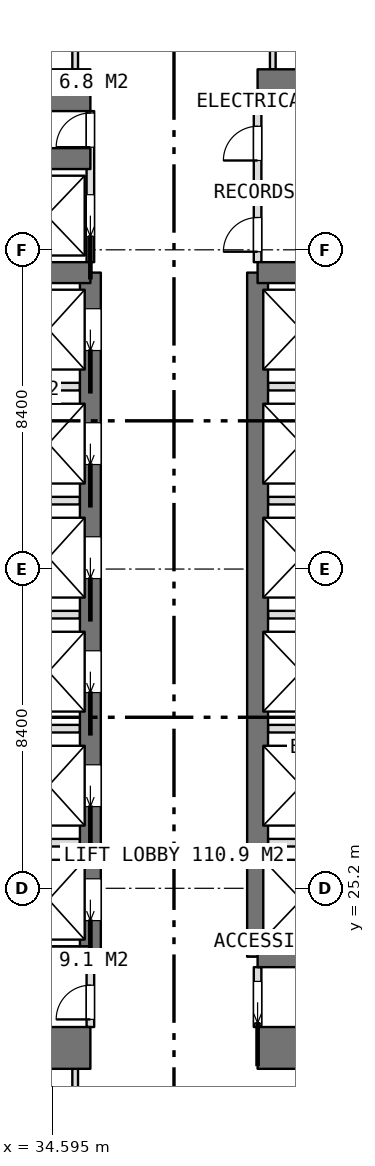
"""IFC4 building model, lengths in metres.
Left out: names, types, materials, properties, quantities, classifications, styles, units other than length and angle.
Written with IfcOpenShell. Run it as: python <this file> out.ifc"""

import sys

from ifc_helpers import new_model, si_unit, direction, frame, frame_2d, origin, place, context, subcontext, project, spatial, rectangle, extrude, element, fill, save


model = new_model("IFC4")
c1 = context("Model", 3, precision=1e-05, world=origin(), true_north=direction((0.0, 1.0)))
c2 = subcontext(c1, "Body", "Model", "MODEL_VIEW")
j1 = project(units=[si_unit("LENGTHUNIT", "METRE"), si_unit("PLANEANGLEUNIT", "RADIAN")], contexts=[c1])
p1 = place(None, origin())
s1 = spatial("IfcSite", under=j1, at=p1, CompositionType="ELEMENT")
p2 = place(p1, origin())
s2 = spatial("IfcBuilding", under=s1, at=p2, CompositionType="ELEMENT")
p3 = place(p2, frame((0.0, 0.0, 25.4)))
s3 = spatial("IfcBuildingStorey", under=s2, at=p3, CompositionType="ELEMENT", Elevation=25.4)
p4 = place(p3, frame((25.2, 21.0, 0.0), z_axis=(0.0, 0.0, 1.0), x_axis=(1.0, 0.0, 0.0)))
e1 = element("IfcWall", 1, at=p4, inside=s3, PredefinedType="SHEAR", context=c2, shape_type="SweptSolid", body=[
    extrude(rectangle(XDim=10.4, YDim=1.1, at=frame_2d((5.2, 0.0))), origin(), (0.0, 0.0, 1.0), 3.75),
])
p5 = place(p3, frame((40.0, 21.0, 0.0), z_axis=(0.0, 0.0, 1.0), x_axis=(1.0, 0.0, 0.0)))
e2 = element("IfcWall", 2, at=p5, inside=s3, PredefinedType="SHEAR", context=c2, shape_type="SweptSolid", body=[
    extrude(rectangle(XDim=10.4, YDim=1.1, at=frame_2d((5.2, 0.0))), origin(), (0.0, 0.0, 1.0), 3.75),
])
p6 = place(p3, frame((25.2, 46.2, 0.0), z_axis=(0.0, 0.0, 1.0), x_axis=(1.0, 0.0, 0.0)))
e3 = element("IfcWall", 3, at=p6, inside=s3, PredefinedType="SHEAR", context=c2, shape_type="SweptSolid", body=[
    extrude(rectangle(XDim=10.4, YDim=1.1, at=frame_2d((5.2, 0.0))), origin(), (0.0, 0.0, 1.0), 3.75),
])
p7 = place(p3, frame((40.0, 46.2, 0.0), z_axis=(0.0, 0.0, 1.0), x_axis=(1.0, 0.0, 0.0)))
e4 = element("IfcWall", 4, at=p7, inside=s3, PredefinedType="SHEAR", context=c2, shape_type="SweptSolid", body=[
    extrude(rectangle(XDim=10.4, YDim=1.1, at=frame_2d((5.2, 0.0))), origin(), (0.0, 0.0, 1.0), 3.75),
])
p8 = place(p3, frame((35.6, 23.4, 0.0), z_axis=(0.0, 0.0, 1.0), x_axis=(0.0, 1.0, 0.0)))
e5 = element("IfcWall", 5, at=p8, inside=s3, PredefinedType="SHEAR", context=c2, shape_type="SweptSolid", body=[
    extrude(rectangle(XDim=18.0, YDim=0.55, at=frame_2d((9.0, 0.0))), origin(), (0.0, 0.0, 1.0), 3.75),
])
p9 = place(p8, frame((0.95, 0.0, 0.0)))
e6 = element("IfcOpeningElement", 6, at=p9, cuts=e5, PredefinedType="OPENING", context=c2, shape_type="SweptSolid", body=[
    extrude(rectangle(XDim=1.1, YDim=2.1, at=frame_2d((0.55, 1.05))), frame((0.0, 0.285, 0.0), z_axis=(0.0, -1.0, 0.0), x_axis=(1.0, 0.0, 0.0)), (0.0, 0.0, 1.0), 0.57),
])
p10 = place(p8, frame((3.95, 0.0, 0.0)))
e7 = element("IfcOpeningElement", 7, at=p10, cuts=e5, PredefinedType="OPENING", context=c2, shape_type="SweptSolid", body=[
    extrude(rectangle(XDim=1.1, YDim=2.1, at=frame_2d((0.55, 1.05))), frame((0.0, 0.285, 0.0), z_axis=(0.0, -1.0, 0.0), x_axis=(1.0, 0.0, 0.0)), (0.0, 0.0, 1.0), 0.57),
])
p11 = place(p8, frame((6.95, 0.0, 0.0)))
e8 = element("IfcOpeningElement", 8, at=p11, cuts=e5, PredefinedType="OPENING", context=c2, shape_type="SweptSolid", body=[
    extrude(rectangle(XDim=1.1, YDim=2.1, at=frame_2d((0.55, 1.05))), frame((0.0, 0.285, 0.0), z_axis=(0.0, -1.0, 0.0), x_axis=(1.0, 0.0, 0.0)), (0.0, 0.0, 1.0), 0.57),
])
p12 = place(p8, frame((9.95, 0.0, 0.0)))
e9 = element("IfcOpeningElement", 9, at=p12, cuts=e5, PredefinedType="OPENING", context=c2, shape_type="SweptSolid", body=[
    extrude(rectangle(XDim=1.1, YDim=2.1, at=frame_2d((0.55, 1.05))), frame((0.0, 0.285, 0.0), z_axis=(0.0, -1.0, 0.0), x_axis=(1.0, 0.0, 0.0)), (0.0, 0.0, 1.0), 0.57),
])
p13 = place(p8, frame((12.95, 0.0, 0.0)))
e10 = element("IfcOpeningElement", 10, at=p13, cuts=e5, PredefinedType="OPENING", context=c2, shape_type="SweptSolid", body=[
    extrude(rectangle(XDim=1.1, YDim=2.1, at=frame_2d((0.55, 1.05))), frame((0.0, 0.285, 0.0), z_axis=(0.0, -1.0, 0.0), x_axis=(1.0, 0.0, 0.0)), (0.0, 0.0, 1.0), 0.57),
])
p14 = place(p8, frame((15.95, 0.0, 0.0)))
e11 = element("IfcOpeningElement", 11, at=p14, cuts=e5, PredefinedType="OPENING", context=c2, shape_type="SweptSolid", body=[
    extrude(rectangle(XDim=1.1, YDim=2.1, at=frame_2d((0.55, 1.05))), frame((0.0, 0.285, 0.0), z_axis=(0.0, -1.0, 0.0), x_axis=(1.0, 0.0, 0.0)), (0.0, 0.0, 1.0), 0.57),
])
p15 = place(p3, frame((40.0, 23.4, 0.0), z_axis=(0.0, 0.0, 1.0), x_axis=(0.0, 1.0, 0.0)))
e12 = element("IfcWall", 12, at=p15, inside=s3, PredefinedType="SHEAR", context=c2, shape_type="SweptSolid", body=[
    extrude(rectangle(XDim=18.0, YDim=0.55, at=frame_2d((9.0, 0.0))), origin(), (0.0, 0.0, 1.0), 3.75),
])
for number, where, z_axis, x_axis in (
    (13, (31.8, 23.4, 0.0), (0.0, 0.0, 1.0), (1.0, 0.0, 0.0)),
    (14, (31.8, 41.4, 0.0), (0.0, 0.0, 1.0), (1.0, 0.0, 0.0)),
    (15, (31.8, 44.4, 0.0), (0.0, 0.0, 1.0), (1.0, 0.0, 0.0)),
    (16, (40.0, 23.4, 0.0), (0.0, 0.0, 1.0), (1.0, 0.0, 0.0)),
    (17, (40.0, 41.4, 0.0), (0.0, 0.0, 1.0), (1.0, 0.0, 0.0)),
):
    element("IfcWall", number, at=place(p3, frame(where, z_axis=z_axis, x_axis=x_axis)), inside=s3, PredefinedType="SHEAR", context=c2, shape_type="SweptSolid", body=[
        extrude(rectangle(XDim=3.8, YDim=0.55, at=frame_2d((1.9, 0.0))), origin(), (0.0, 0.0, 1.0), 3.75),
    ])
for number, where, z_axis, x_axis in (
    (18, (32.075, 26.4, 0.0), (0.0, 0.0, 1.0), (1.0, 0.0, 0.0)),
    (19, (32.075, 29.4, 0.0), (0.0, 0.0, 1.0), (1.0, 0.0, 0.0)),
    (20, (32.075, 32.4, 0.0), (0.0, 0.0, 1.0), (1.0, 0.0, 0.0)),
    (21, (32.075, 35.4, 0.0), (0.0, 0.0, 1.0), (1.0, 0.0, 0.0)),
    (22, (32.075, 38.4, 0.0), (0.0, 0.0, 1.0), (1.0, 0.0, 0.0)),
    (23, (40.275, 26.4, 0.0), (0.0, 0.0, 1.0), (1.0, 0.0, 0.0)),
    (24, (40.275, 29.4, 0.0), (0.0, 0.0, 1.0), (1.0, 0.0, 0.0)),
    (25, (40.275, 32.4, 0.0), (0.0, 0.0, 1.0), (1.0, 0.0, 0.0)),
    (26, (40.275, 35.4, 0.0), (0.0, 0.0, 1.0), (1.0, 0.0, 0.0)),
    (27, (40.275, 38.4, 0.0), (0.0, 0.0, 1.0), (1.0, 0.0, 0.0)),
):
    element("IfcWall", number, at=place(p3, frame(where, z_axis=z_axis, x_axis=x_axis)), inside=s3, PredefinedType="PARTITIONING", context=c2, shape_type="SweptSolid", body=[
        extrude(rectangle(XDim=3.25, YDim=0.2, at=frame_2d((1.625, 0.0))), origin(), (0.0, 0.0, 1.0), 3.5),
    ])
p16 = place(p3, frame((40.0, 21.55, 0.0), z_axis=(0.0, 0.0, 1.0), x_axis=(0.0, 1.0, 0.0)))
e28 = element("IfcWall", 28, at=p16, inside=s3, PredefinedType="PARTITIONING", context=c2, shape_type="SweptSolid", body=[
    extrude(rectangle(XDim=1.575, YDim=0.2, at=frame_2d((0.788, 0.0))), origin(), (0.0, 0.0, 1.0), 3.5),
])
p17 = place(p16, frame((0.1, 0.0, 0.0)))
e29 = element("IfcOpeningElement", 29, at=p17, cuts=e28, PredefinedType="OPENING", context=c2, shape_type="SweptSolid", body=[
    extrude(rectangle(XDim=1.1, YDim=2.1, at=frame_2d((0.55, 1.05))), frame((0.0, 0.11, 0.0), z_axis=(0.0, -1.0, 0.0), x_axis=(1.0, 0.0, 0.0)), (0.0, 0.0, 1.0), 0.22),
])
p18 = place(p3, frame((40.0, 41.675, 0.0), z_axis=(0.0, 0.0, 1.0), x_axis=(0.0, 1.0, 0.0)))
e30 = element("IfcWall", 30, at=p18, inside=s3, PredefinedType="PARTITIONING", context=c2, shape_type="SweptSolid", body=[
    extrude(rectangle(XDim=3.975, YDim=0.2, at=frame_2d((1.987, 0.0))), origin(), (0.0, 0.0, 1.0), 3.5),
])
p19 = place(p18, frame((2.675, 0.0, 0.0)))
e31 = element("IfcOpeningElement", 31, at=p19, cuts=e30, PredefinedType="OPENING", context=c2, shape_type="SweptSolid", body=[
    extrude(rectangle(XDim=0.9, YDim=2.1, at=frame_2d((0.45, 1.05))), frame((0.0, 0.11, 0.0), z_axis=(0.0, -1.0, 0.0), x_axis=(1.0, 0.0, 0.0)), (0.0, 0.0, 1.0), 0.22),
])
p20 = place(p18, frame((0.275, 0.0, 0.0)))
e32 = element("IfcOpeningElement", 32, at=p20, cuts=e30, PredefinedType="OPENING", context=c2, shape_type="SweptSolid", body=[
    extrude(rectangle(XDim=0.9, YDim=2.1, at=frame_2d((0.45, 1.05))), frame((0.0, 0.11, 0.0), z_axis=(0.0, -1.0, 0.0), x_axis=(1.0, 0.0, 0.0)), (0.0, 0.0, 1.0), 0.22),
])
p21 = place(p3, frame((35.6, 41.675, 0.0), z_axis=(0.0, 0.0, 1.0), x_axis=(0.0, 1.0, 0.0)))
e33 = element("IfcWall", 33, at=p21, inside=s3, PredefinedType="PARTITIONING", context=c2, shape_type="SweptSolid", body=[
    extrude(rectangle(XDim=3.975, YDim=0.2, at=frame_2d((1.987, 0.0))), origin(), (0.0, 0.0, 1.0), 3.5),
])
p22 = place(p21, frame((3.025, 0.0, 0.0)))
e34 = element("IfcOpeningElement", 34, at=p22, cuts=e33, PredefinedType="OPENING", context=c2, shape_type="SweptSolid", body=[
    extrude(rectangle(XDim=0.9, YDim=2.1, at=frame_2d((0.45, 1.05))), frame((0.0, 0.11, 0.0), z_axis=(0.0, -1.0, 0.0), x_axis=(1.0, 0.0, 0.0)), (0.0, 0.0, 1.0), 0.22),
])
p23 = place(p21, frame((0.675, 0.0, 0.0)))
e35 = element("IfcOpeningElement", 35, at=p23, cuts=e33, PredefinedType="OPENING", context=c2, shape_type="SweptSolid", body=[
    extrude(rectangle(XDim=1.1, YDim=2.1, at=frame_2d((0.55, 1.05))), frame((0.0, 0.11, 0.0), z_axis=(0.0, -1.0, 0.0), x_axis=(1.0, 0.0, 0.0)), (0.0, 0.0, 1.0), 0.22),
])
p24 = place(p3, frame((35.6, 21.55, 0.0), z_axis=(0.0, 0.0, 1.0), x_axis=(0.0, 1.0, 0.0)))
e36 = element("IfcWall", 36, at=p24, inside=s3, PredefinedType="PARTITIONING", context=c2, shape_type="SweptSolid", body=[
    extrude(rectangle(XDim=1.575, YDim=0.2, at=frame_2d((0.788, 0.0))), origin(), (0.0, 0.0, 1.0), 3.5),
])
p25 = place(p24, frame((0.2, 0.0, 0.0)))
e37 = element("IfcOpeningElement", 37, at=p25, cuts=e36, PredefinedType="OPENING", context=c2, shape_type="SweptSolid", body=[
    extrude(rectangle(XDim=0.9, YDim=2.1, at=frame_2d((0.45, 1.05))), frame((0.0, 0.11, 0.0), z_axis=(0.0, -1.0, 0.0), x_axis=(1.0, 0.0, 0.0)), (0.0, 0.0, 1.0), 0.22),
])
p26 = place(p3, frame((40.0, 43.4, 0.0), z_axis=(0.0, 0.0, 1.0), x_axis=(1.0, 0.0, 0.0)))
e38 = element("IfcWall", 38, at=p26, inside=s3, PredefinedType="PARTITIONING", context=c2, shape_type="SweptSolid", body=[
    extrude(rectangle(XDim=3.525, YDim=0.2, at=frame_2d((1.762, 0.0))), origin(), (0.0, 0.0, 1.0), 3.5),
])
for number, where, z_axis, x_axis in (
    (39, (40.4, 46.75, 0.0), (0.0, 0.0, 1.0), (0.0, 1.0, 0.0)),
    (40, (35.2, 46.75, 0.0), (0.0, 0.0, 1.0), (0.0, 1.0, 0.0)),
    (41, (35.2, 17.875, 0.0), (0.0, 0.0, 1.0), (0.0, 1.0, 0.0)),
):
    element("IfcWall", number, at=place(p3, frame(where, z_axis=z_axis, x_axis=x_axis)), inside=s3, PredefinedType="PARTITIONING", context=c2, shape_type="SweptSolid", body=[
        extrude(rectangle(XDim=2.575, YDim=0.15, at=frame_2d((1.288, 0.0))), origin(), (0.0, 0.0, 1.0), 3.5),
    ])
p27 = place(p17, origin())
e42 = element("IfcDoor", 42, at=p27, inside=s3, OperationType="SLIDING_TO_LEFT", PredefinedType="DOOR", context=c2, shape_type="SweptSolid", body=[
    extrude(rectangle(XDim=1.1, YDim=2.1, at=frame_2d((0.55, 1.05))), frame((0.0, 0.025, 0.0), z_axis=(0.0, -1.0, 0.0), x_axis=(1.0, 0.0, 0.0)), (0.0, 0.0, 1.0), 0.05),
])
fill(e29, e42)
p28 = place(p25, origin())
e43 = element("IfcDoor", 43, at=p28, inside=s3, OperationType="SINGLE_SWING_LEFT", PredefinedType="DOOR", context=c2, shape_type="SweptSolid", body=[
    extrude(rectangle(XDim=0.9, YDim=2.1, at=frame_2d((0.45, 1.05))), frame((0.0, 0.025, 0.0), z_axis=(0.0, -1.0, 0.0), x_axis=(1.0, 0.0, 0.0)), (0.0, 0.0, 1.0), 0.05),
])
fill(e37, e43)
p29 = place(p19, origin())
e44 = element("IfcDoor", 44, at=p29, inside=s3, OperationType="SINGLE_SWING_LEFT", PredefinedType="DOOR", context=c2, shape_type="SweptSolid", body=[
    extrude(rectangle(XDim=0.9, YDim=2.1, at=frame_2d((0.45, 1.05))), frame((0.0, 0.025, 0.0), z_axis=(0.0, -1.0, 0.0), x_axis=(1.0, 0.0, 0.0)), (0.0, 0.0, 1.0), 0.05),
])
fill(e31, e44)
p30 = place(p20, origin())
e45 = element("IfcDoor", 45, at=p30, inside=s3, OperationType="SINGLE_SWING_LEFT", PredefinedType="DOOR", context=c2, shape_type="SweptSolid", body=[
    extrude(rectangle(XDim=0.9, YDim=2.1, at=frame_2d((0.45, 1.05))), frame((0.0, 0.025, 0.0), z_axis=(0.0, -1.0, 0.0), x_axis=(1.0, 0.0, 0.0)), (0.0, 0.0, 1.0), 0.05),
])
fill(e32, e45)
p31 = place(p22, origin())
e46 = element("IfcDoor", 46, at=p31, inside=s3, OperationType="SINGLE_SWING_LEFT", PredefinedType="DOOR", context=c2, shape_type="SweptSolid", body=[
    extrude(rectangle(XDim=0.9, YDim=2.1, at=frame_2d((0.45, 1.05))), frame((0.0, 0.025, 0.0), z_axis=(0.0, -1.0, 0.0), x_axis=(1.0, 0.0, 0.0)), (0.0, 0.0, 1.0), 0.05),
])
fill(e34, e46)
p32 = place(p9, origin())
e47 = element("IfcDoor", 47, at=p32, inside=s3, OperationType="SLIDING_TO_LEFT", PredefinedType="USERDEFINED", context=c2, shape_type="SweptSolid", body=[
    extrude(rectangle(XDim=1.1, YDim=2.1, at=frame_2d((0.55, 1.05))), frame((0.0, 0.025, 0.0), z_axis=(0.0, -1.0, 0.0), x_axis=(1.0, 0.0, 0.0)), (0.0, 0.0, 1.0), 0.05),
])
fill(e6, e47)
p33 = place(p10, origin())
e48 = element("IfcDoor", 48, at=p33, inside=s3, OperationType="SLIDING_TO_LEFT", PredefinedType="USERDEFINED", context=c2, shape_type="SweptSolid", body=[
    extrude(rectangle(XDim=1.1, YDim=2.1, at=frame_2d((0.55, 1.05))), frame((0.0, 0.025, 0.0), z_axis=(0.0, -1.0, 0.0), x_axis=(1.0, 0.0, 0.0)), (0.0, 0.0, 1.0), 0.05),
])
fill(e7, e48)
p34 = place(p11, origin())
e49 = element("IfcDoor", 49, at=p34, inside=s3, OperationType="SLIDING_TO_LEFT", PredefinedType="USERDEFINED", context=c2, shape_type="SweptSolid", body=[
    extrude(rectangle(XDim=1.1, YDim=2.1, at=frame_2d((0.55, 1.05))), frame((0.0, 0.025, 0.0), z_axis=(0.0, -1.0, 0.0), x_axis=(1.0, 0.0, 0.0)), (0.0, 0.0, 1.0), 0.05),
])
fill(e8, e49)
p35 = place(p12, origin())
e50 = element("IfcDoor", 50, at=p35, inside=s3, OperationType="SLIDING_TO_LEFT", PredefinedType="USERDEFINED", context=c2, shape_type="SweptSolid", body=[
    extrude(rectangle(XDim=1.1, YDim=2.1, at=frame_2d((0.55, 1.05))), frame((0.0, 0.025, 0.0), z_axis=(0.0, -1.0, 0.0), x_axis=(1.0, 0.0, 0.0)), (0.0, 0.0, 1.0), 0.05),
])
fill(e9, e50)
p36 = place(p13, origin())
e51 = element("IfcDoor", 51, at=p36, inside=s3, OperationType="SLIDING_TO_LEFT", PredefinedType="USERDEFINED", context=c2, shape_type="SweptSolid", body=[
    extrude(rectangle(XDim=1.1, YDim=2.1, at=frame_2d((0.55, 1.05))), frame((0.0, 0.025, 0.0), z_axis=(0.0, -1.0, 0.0), x_axis=(1.0, 0.0, 0.0)), (0.0, 0.0, 1.0), 0.05),
])
fill(e10, e51)
p37 = place(p14, origin())
e52 = element("IfcDoor", 52, at=p37, inside=s3, OperationType="SLIDING_TO_LEFT", PredefinedType="USERDEFINED", context=c2, shape_type="SweptSolid", body=[
    extrude(rectangle(XDim=1.1, YDim=2.1, at=frame_2d((0.55, 1.05))), frame((0.0, 0.025, 0.0), z_axis=(0.0, -1.0, 0.0), x_axis=(1.0, 0.0, 0.0)), (0.0, 0.0, 1.0), 0.05),
])
fill(e11, e52)
p38 = place(p23, origin())
e53 = element("IfcDoor", 53, at=p38, inside=s3, OperationType="SLIDING_TO_LEFT", PredefinedType="USERDEFINED", context=c2, shape_type="SweptSolid", body=[
    extrude(rectangle(XDim=1.1, YDim=2.1, at=frame_2d((0.55, 1.05))), frame((0.0, 0.025, 0.0), z_axis=(0.0, -1.0, 0.0), x_axis=(1.0, 0.0, 0.0)), (0.0, 0.0, 1.0), 0.05),
])
fill(e35, e53)
save(model, sys.argv[1])
